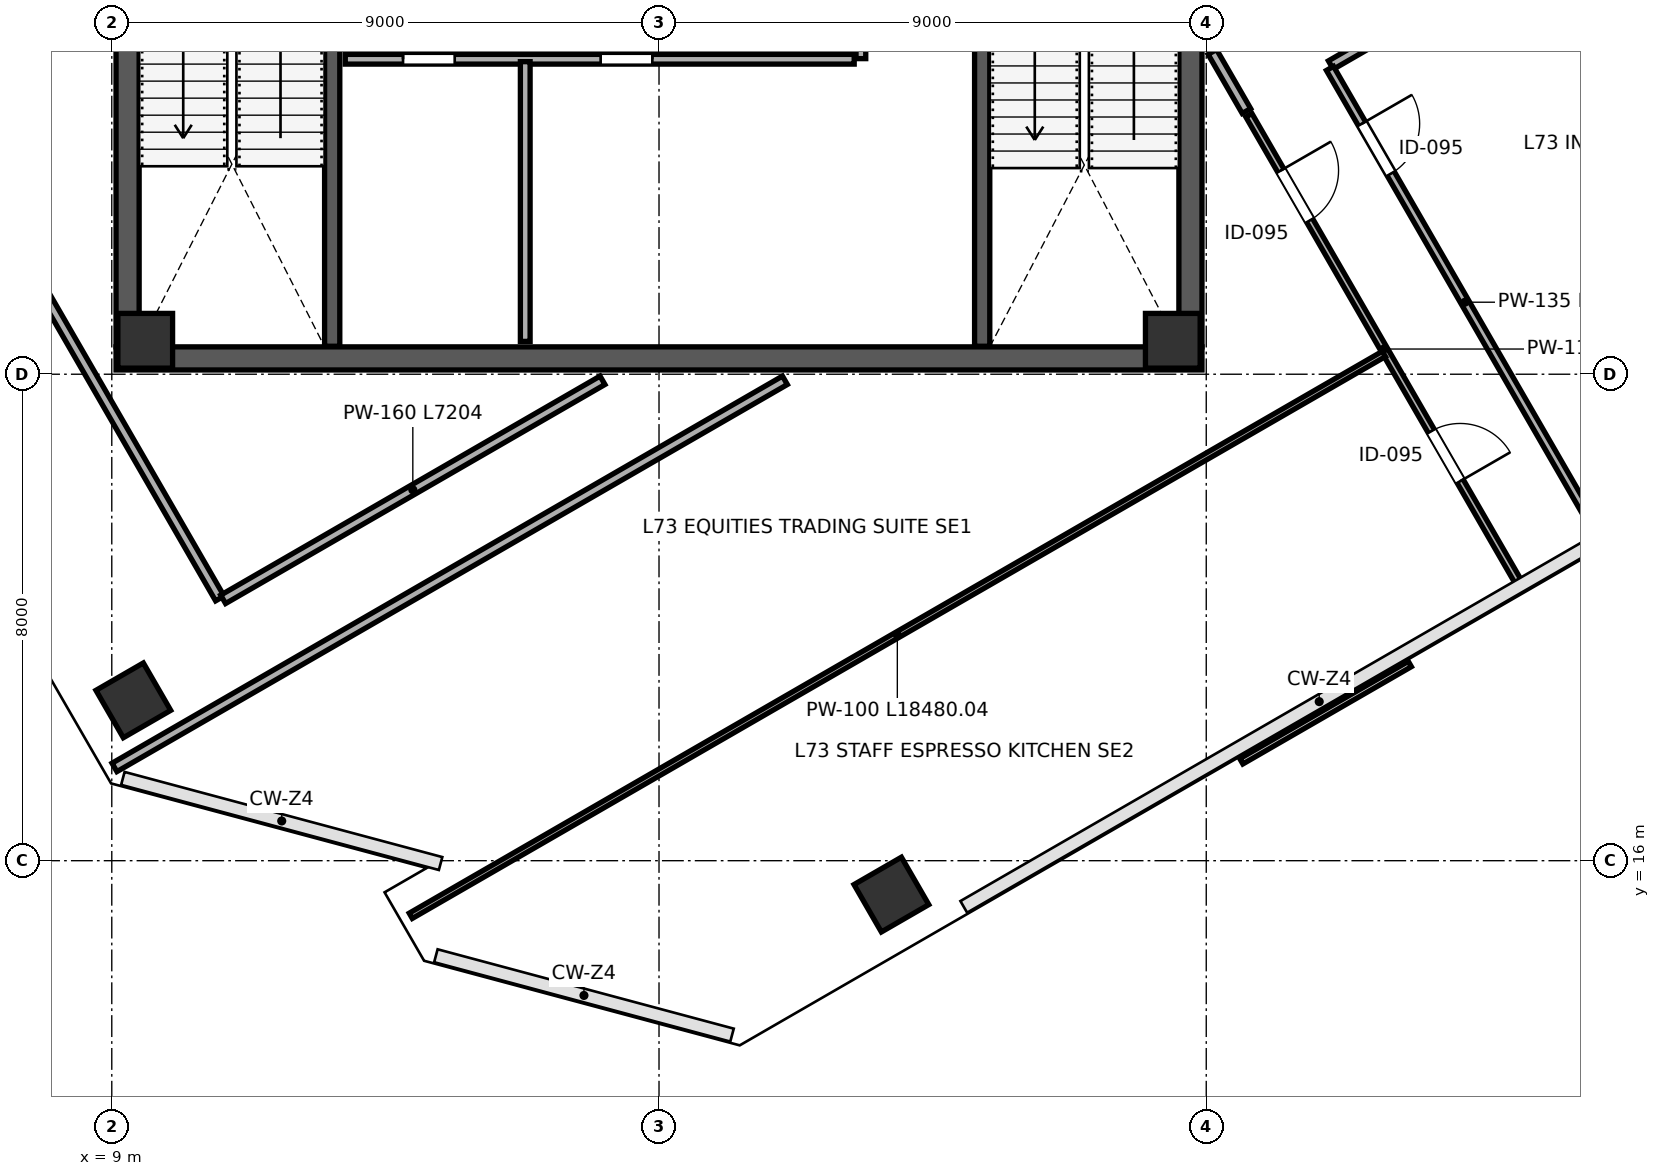
"""IFC4 building model, lengths in metres.
Left out: names, types, materials, properties, quantities, classifications, styles, units other than length and angle.
Written with IfcOpenShell. Run it as: python <this file> out.ifc"""

import sys

from ifc_helpers import new_model, si_unit, direction, frame, frame_2d, origin, origin_2d, place, context, subcontext, project, spatial, rectangle, extrude, clip, halfspace, source, transform, mapped, element, fill, save


model = new_model("IFC4")
c1 = context("Model", 3, precision=1e-05, world=origin(), true_north=direction((0.0, 1.0)))
c2 = subcontext(c1, "Body", "Model", "MODEL_VIEW")
j1 = project(units=[si_unit("LENGTHUNIT", "METRE"), si_unit("PLANEANGLEUNIT", "RADIAN")], contexts=[c1])
p1 = place(None, origin())
s1 = spatial("IfcSite", under=j1, at=p1, CompositionType="ELEMENT")
p2 = place(p1, origin())
s2 = spatial("IfcBuilding", under=s1, at=p2, CompositionType="ELEMENT")
p3 = place(p2, frame((0.0, 0.0, 324.0)))
s3 = spatial("IfcBuildingStorey", under=s2, at=p3, CompositionType="ELEMENT", Elevation=324.0)
m1 = source(origin(), c2, "Body", "SweptSolid", [
    extrude(rectangle(XDim=0.9, YDim=0.9, at=origin_2d()), origin(), (0.0, 0.0, 1.0), 4.198),
])
for number, where, z_axis, x_axis in (
    (1, (9.55, 24.55, 0.001), (0.0, 0.0, 1.0), (1.0, 0.0, 0.0)),
    (2, (26.45, 24.55, 0.001), (0.0, 0.0, 1.0), (1.0, 0.0, 0.0)),
):
    element("IfcColumn", number, at=place(p3, frame(where, z_axis=z_axis, x_axis=x_axis)), inside=s3, PredefinedType="COLUMN", context=c2, shape_type="MappedRepresentation", body=[
        mapped(m1, transform((0.0, 0.0, 0.0), scale=1.0)),
    ])
p4 = place(p3, frame((9.354, 18.637, 0.0), z_axis=(-0.133747241833, 0.126948471317, 0.982850833511), x_axis=(0.961573158376, -0.223324610803, 0.159697148693)))
e3 = element("IfcColumn", 3, at=p4, inside=s3, PredefinedType="COLUMN", context=c2, shape_type="Clipping", body=[
    clip(clip(extrude(rectangle(XDim=0.9, YDim=0.9, at=origin_2d()), origin(), (0.0, 0.0, 1.0), 4.273), halfspace(frame((0.0, 0.0, 0.116), z_axis=(0.0, 0.0, -1.0), x_axis=(1.0, 0.0, 0.0)), False)), halfspace(frame((0.0, 0.0, 4.157), z_axis=(0.0, 0.0, 1.0), x_axis=(1.0, 0.0, 0.0)), False)),
])
p5 = place(p3, frame((21.822, 15.443, 0.0), z_axis=(-0.169515530919, 0.000401016802, 0.985527434404), x_axis=(0.854672234832, 0.497979531687, 0.146805166898)))
e4 = element("IfcColumn", 4, at=p5, inside=s3, PredefinedType="COLUMN", context=c2, shape_type="Clipping", body=[
    clip(clip(extrude(rectangle(XDim=0.9, YDim=0.9, at=origin_2d()), origin(), (0.0, 0.0, 1.0), 4.262), halfspace(frame((0.0, 0.0, 0.106), z_axis=(0.0, 0.0, -1.0), x_axis=(1.0, 0.0, 0.0)), False)), halfspace(frame((0.0, 0.0, 4.155), z_axis=(0.0, 0.0, 1.0), x_axis=(1.0, 0.0, 0.0)), False)),
])
p6 = place(p3, frame((9.26, 24.45, 0.0), z_axis=(0.0, 0.0, 1.0), x_axis=(0.0, 1.0, 0.0)))
e5 = element("IfcWall", 5, at=p6, inside=s3, PredefinedType="SHEAR", context=c2, shape_type="SweptSolid", body=[
    extrude(rectangle(XDim=15.1, YDim=0.38, at=frame_2d((7.55, 0.0))), origin(), (0.0, 0.0, 1.0), 3.96),
])
p7 = place(p6, frame((8.7, 0.0, 0.0)))
e6 = element("IfcOpeningElement", 6, at=p7, cuts=e5, PredefinedType="OPENING", context=c2, shape_type="SweptSolid", body=[
    extrude(rectangle(XDim=1.15, YDim=2.2, at=frame_2d((0.575, 1.1))), frame((0.0, 0.2, 0.0), z_axis=(0.0, -1.0, 0.0), x_axis=(1.0, 0.0, 0.0)), (0.0, 0.0, 1.0), 0.4),
])
p8 = place(p3, frame((26.74, 24.45, 0.0), z_axis=(0.0, 0.0, 1.0), x_axis=(0.0, 1.0, 0.0)))
e7 = element("IfcWall", 7, at=p8, inside=s3, PredefinedType="SHEAR", context=c2, shape_type="SweptSolid", body=[
    extrude(rectangle(XDim=15.1, YDim=0.38, at=frame_2d((7.55, 0.0))), origin(), (0.0, 0.0, 1.0), 3.96),
])
p9 = place(p8, frame((8.6, 0.0, 0.0)))
e8 = element("IfcOpeningElement", 8, at=p9, cuts=e7, PredefinedType="OPENING", context=c2, shape_type="SweptSolid", body=[
    extrude(rectangle(XDim=1.15, YDim=2.2, at=frame_2d((0.575, 1.1))), frame((0.0, 0.2, 0.0), z_axis=(0.0, -1.0, 0.0), x_axis=(1.0, 0.0, 0.0)), (0.0, 0.0, 1.0), 0.4),
])
p10 = place(p3, frame((9.07, 24.26, 0.0), z_axis=(0.0, 0.0, 1.0), x_axis=(1.0, 0.0, 0.0)))
e9 = element("IfcWall", 9, at=p10, inside=s3, PredefinedType="SHEAR", context=c2, shape_type="SweptSolid", body=[
    extrude(rectangle(XDim=17.86, YDim=0.38, at=frame_2d((8.93, 0.0))), origin(), (0.0, 0.0, 1.0), 3.96),
])
p11 = place(p3, frame((12.625, 24.46, 0.0), z_axis=(0.0, 0.0, 1.0), x_axis=(0.0, 1.0, 0.0)))
e10 = element("IfcWall", 10, at=p11, inside=s3, PredefinedType="SHEAR", context=c2, shape_type="SweptSolid", body=[
    extrude(rectangle(XDim=7.49, YDim=0.25, at=frame_2d((3.745, 0.0))), origin(), (0.0, 0.0, 1.0), 3.96),
])
p12 = place(p11, frame((5.85, 0.0, 0.0)))
e11 = element("IfcOpeningElement", 11, at=p12, cuts=e10, PredefinedType="OPENING", context=c2, shape_type="SweptSolid", body=[
    extrude(rectangle(XDim=1.15, YDim=2.2, at=frame_2d((0.575, 1.1))), frame((0.0, 0.135, 0.0), z_axis=(0.0, -1.0, 0.0), x_axis=(1.0, 0.0, 0.0)), (0.0, 0.0, 1.0), 0.27),
])
p13 = place(p3, frame((23.315, 24.46, 0.0), z_axis=(0.0, 0.0, 1.0), x_axis=(0.0, 1.0, 0.0)))
e12 = element("IfcWall", 12, at=p13, inside=s3, PredefinedType="SHEAR", context=c2, shape_type="SweptSolid", body=[
    extrude(rectangle(XDim=7.49, YDim=0.25, at=frame_2d((3.745, 0.0))), origin(), (0.0, 0.0, 1.0), 3.96),
])
p14 = place(p3, frame((12.84, 29.18, 0.0), z_axis=(0.0, 0.0, 1.0), x_axis=(1.0, 0.0, 0.0)))
e13 = element("IfcWall", 13, at=p14, inside=s3, PredefinedType="PARTITIONING", context=c2, shape_type="SweptSolid", body=[
    extrude(rectangle(XDim=8.37, YDim=0.16, at=frame_2d((4.185, 0.0))), origin(), (0.0, 0.0, 1.0), 3.96),
])
p15 = place(p14, frame((0.95, 0.0, 0.0)))
e14 = element("IfcOpeningElement", 14, at=p15, cuts=e13, PredefinedType="OPENING", context=c2, shape_type="SweptSolid", body=[
    extrude(rectangle(XDim=0.85, YDim=2.1, at=frame_2d((0.425, 1.05))), frame((0.0, 0.09, 0.0), z_axis=(0.0, -1.0, 0.0), x_axis=(1.0, 0.0, 0.0)), (0.0, 0.0, 1.0), 0.18),
])
p16 = place(p14, frame((4.2, 0.0, 0.0)))
e15 = element("IfcOpeningElement", 15, at=p16, cuts=e13, PredefinedType="OPENING", context=c2, shape_type="SweptSolid", body=[
    extrude(rectangle(XDim=0.85, YDim=2.1, at=frame_2d((0.425, 1.05))), frame((0.0, 0.09, 0.0), z_axis=(0.0, -1.0, 0.0), x_axis=(1.0, 0.0, 0.0)), (0.0, 0.0, 1.0), 0.18),
])
p17 = place(p3, frame((15.8, 24.54, 0.0), z_axis=(0.0, 0.0, 1.0), x_axis=(0.0, 1.0, 0.0)))
e16 = element("IfcWall", 16, at=p17, inside=s3, PredefinedType="PARTITIONING", context=c2, shape_type="SweptSolid", body=[
    extrude(rectangle(XDim=4.6, YDim=0.16, at=frame_2d((2.3, 0.0))), origin(), (0.0, 0.0, 1.0), 3.96),
])
p18 = place(p3, frame((21.32, 29.19, 0.0), z_axis=(0.0, 0.0, 1.0), x_axis=(0.0, 1.0, 0.0)))
e17 = element("IfcWall", 17, at=p18, inside=s3, PredefinedType="PARTITIONING", context=c2, shape_type="SweptSolid", body=[
    extrude(rectangle(XDim=2.92, YDim=0.16, at=frame_2d((1.46, 0.0))), origin(), (0.0, 0.0, 1.0), 3.96),
])
p19 = place(p3, frame((3.742, 32.498, 0.0), z_axis=(0.0, 0.0, 1.0), x_axis=(0.500005830994, -0.866022037233, 0.0)))
e18 = element("IfcWall", 18, at=p19, inside=s3, PredefinedType="PARTITIONING", context=c2, shape_type="SweptSolid", body=[
    extrude(rectangle(XDim=14.07, YDim=0.16, at=frame_2d((7.035, 0.0))), origin(), (0.0, 0.0, 1.0), 3.96),
])
p20 = place(p19, frame((1.15, 0.0, 0.0)))
e19 = element("IfcOpeningElement", 19, at=p20, cuts=e18, PredefinedType="OPENING", context=c2, shape_type="SweptSolid", body=[
    extrude(rectangle(XDim=0.95, YDim=2.15, at=frame_2d((0.475, 1.075))), frame((0.0, 0.09, 0.0), z_axis=(0.0, -1.0, 0.0), x_axis=(1.0, 0.0, 0.0)), (0.0, 0.0, 1.0), 0.18),
])
p21 = place(p3, frame((10.832, 20.298, 0.0), z_axis=(0.0, 0.0, 1.0), x_axis=(0.866042809144, 0.499969851821, 0.0)))
e20 = element("IfcWall", 20, at=p21, inside=s3, PredefinedType="PARTITIONING", context=c2, shape_type="SweptSolid", body=[
    extrude(rectangle(XDim=7.204, YDim=0.16, at=frame_2d((3.602, 0.0))), origin(), (0.0, 0.0, 1.0), 3.96),
])
p22 = place(p3, frame((27.1, 29.301, 0.0), z_axis=(0.0, 0.0, 1.0), x_axis=(0.499929606556, -0.866066041644, 0.0)))
e21 = element("IfcWall", 21, at=p22, inside=s3, PredefinedType="PARTITIONING", context=c2, shape_type="SweptSolid", body=[
    extrude(rectangle(XDim=1.122, YDim=0.16, at=frame_2d((0.561, 0.0))), origin(), (0.0, 0.0, 1.0), 3.96),
])
p23 = place(p3, frame((29.049, 29.084, 0.0), z_axis=(0.0, 0.0, 1.0), x_axis=(0.866013648801, 0.500020359676, 0.0)))
e22 = element("IfcWall", 22, at=p23, inside=s3, PredefinedType="PARTITIONING", context=c2, shape_type="SweptSolid", body=[
    extrude(rectangle(XDim=2.53, YDim=0.16, at=frame_2d((1.265, 0.0))), origin(), (0.0, 0.0, 1.0), 3.96),
])
p24 = place(p3, frame((9.044, 17.534, 0.0), z_axis=(0.0, 0.0, 1.0), x_axis=(0.866029119881, 0.499993563477, 0.0)))
e23 = element("IfcWall", 23, at=p24, inside=s3, PredefinedType="PARTITIONING", context=c2, shape_type="SweptSolid", body=[
    extrude(rectangle(XDim=12.732, YDim=0.16, at=frame_2d((6.366, 0.0))), origin(), (0.0, 0.0, 1.0), 3.96),
])
p25 = place(p3, frame((29.035, 29.029, 0.0), z_axis=(0.0, 0.0, 1.0), x_axis=(0.500000904628, -0.866024881496, 0.0)))
e24 = element("IfcWall", 24, at=p25, inside=s3, PredefinedType="PARTITIONING", context=c2, shape_type="SweptSolid", body=[
    extrude(rectangle(XDim=8.88, YDim=0.135, at=frame_2d((4.44, 0.0))), origin(), (0.0, 0.0, 1.0), 3.96),
])
p26 = place(p25, frame((1.05, 0.0, 0.0)))
e25 = element("IfcOpeningElement", 25, at=p26, cuts=e24, PredefinedType="OPENING", context=c2, shape_type="SweptSolid", body=[
    extrude(rectangle(XDim=0.95, YDim=2.15, at=frame_2d((0.475, 1.075))), frame((0.0, 0.078, 0.0), z_axis=(0.0, -1.0, 0.0), x_axis=(1.0, 0.0, 0.0)), (0.0, 0.0, 1.0), 0.155),
])
p27 = place(p3, frame((27.701, 28.26, 0.0), z_axis=(0.0, 0.0, 1.0), x_axis=(0.499988999718, -0.866031754707, 0.0)))
e26 = element("IfcWall", 26, at=p27, inside=s3, PredefinedType="PARTITIONING", context=c2, shape_type="SweptSolid", body=[
    extrude(rectangle(XDim=8.88, YDim=0.115, at=frame_2d((4.44, 0.0))), origin(), (0.0, 0.0, 1.0), 3.96),
])
p28 = place(p27, frame((1.05, 0.0, 0.0)))
e27 = element("IfcOpeningElement", 27, at=p28, cuts=e26, PredefinedType="OPENING", context=c2, shape_type="SweptSolid", body=[
    extrude(rectangle(XDim=0.95, YDim=2.15, at=frame_2d((0.475, 1.075))), frame((0.0, 0.067, 0.0), z_axis=(0.0, -1.0, 0.0), x_axis=(1.0, 0.0, 0.0)), (0.0, 0.0, 1.0), 0.135),
])
p29 = place(p27, frame((6.0, 0.0, 0.0)))
e28 = element("IfcOpeningElement", 28, at=p29, cuts=e26, PredefinedType="OPENING", context=c2, shape_type="SweptSolid", body=[
    extrude(rectangle(XDim=0.95, YDim=2.15, at=frame_2d((0.475, 1.075))), frame((0.0, 0.067, 0.0), z_axis=(0.0, -1.0, 0.0), x_axis=(1.0, 0.0, 0.0)), (0.0, 0.0, 1.0), 0.135),
])
p30 = place(p3, frame((13.917, 15.094, 0.0), z_axis=(0.0, 0.0, 1.0), x_axis=(0.86602564517, 0.499999581907, 0.0)))
e29 = element("IfcWall", 29, at=p30, inside=s3, PredefinedType="PARTITIONING", context=c2, shape_type="SweptSolid", body=[
    extrude(rectangle(XDim=18.48, YDim=0.1, at=frame_2d((9.24, 0.0))), origin(), (0.0, 0.0, 1.0), 3.96),
])
m2 = source(origin(), c2, "Body", "SweptSolid", [
    extrude(rectangle(XDim=0.85, YDim=2.1, at=frame_2d((0.425, 1.05))), frame((0.0, 0.025, 0.0), z_axis=(0.0, -1.0, 0.0), x_axis=(1.0, 0.0, 0.0)), (0.0, 0.0, 1.0), 0.05),
])
p31 = place(p15, origin())
e30 = element("IfcDoor", 30, at=p31, inside=s3, OperationType="SINGLE_SWING_LEFT", PredefinedType="DOOR", context=c2, shape_type="MappedRepresentation", body=[
    mapped(m2, transform((0.0, 0.0, 0.0), scale=1.0)),
])
fill(e14, e30)
p32 = place(p16, origin())
e31 = element("IfcDoor", 31, at=p32, inside=s3, OperationType="SINGLE_SWING_RIGHT", PredefinedType="DOOR", context=c2, shape_type="MappedRepresentation", body=[
    mapped(m2, transform((0.0, 0.0, 0.0), scale=1.0)),
])
fill(e15, e31)
m3 = source(origin(), c2, "Body", "SweptSolid", [
    extrude(rectangle(XDim=0.95, YDim=2.15, at=frame_2d((0.475, 1.075))), frame((0.0, 0.025, 0.0), z_axis=(0.0, -1.0, 0.0), x_axis=(1.0, 0.0, 0.0)), (0.0, 0.0, 1.0), 0.05),
])
p33 = place(p26, origin())
e32 = element("IfcDoor", 32, at=p33, inside=s3, OperationType="SINGLE_SWING_LEFT", PredefinedType="DOOR", context=c2, shape_type="MappedRepresentation", body=[
    mapped(m3, transform((0.0, 0.0, 0.0), scale=1.0)),
])
fill(e25, e32)
p34 = place(p28, origin())
e33 = element("IfcDoor", 33, at=p34, inside=s3, OperationType="SINGLE_SWING_LEFT", PredefinedType="DOOR", context=c2, shape_type="MappedRepresentation", body=[
    mapped(m3, transform((0.0, 0.0, 0.0), scale=1.0)),
])
fill(e27, e33)
p35 = place(p29, origin())
e34 = element("IfcDoor", 34, at=p35, inside=s3, OperationType="SINGLE_SWING_RIGHT", PredefinedType="DOOR", context=c2, shape_type="MappedRepresentation", body=[
    mapped(m3, transform((0.0, 0.0, 0.0), scale=1.0)),
])
fill(e28, e34)
save(model, sys.argv[1])
